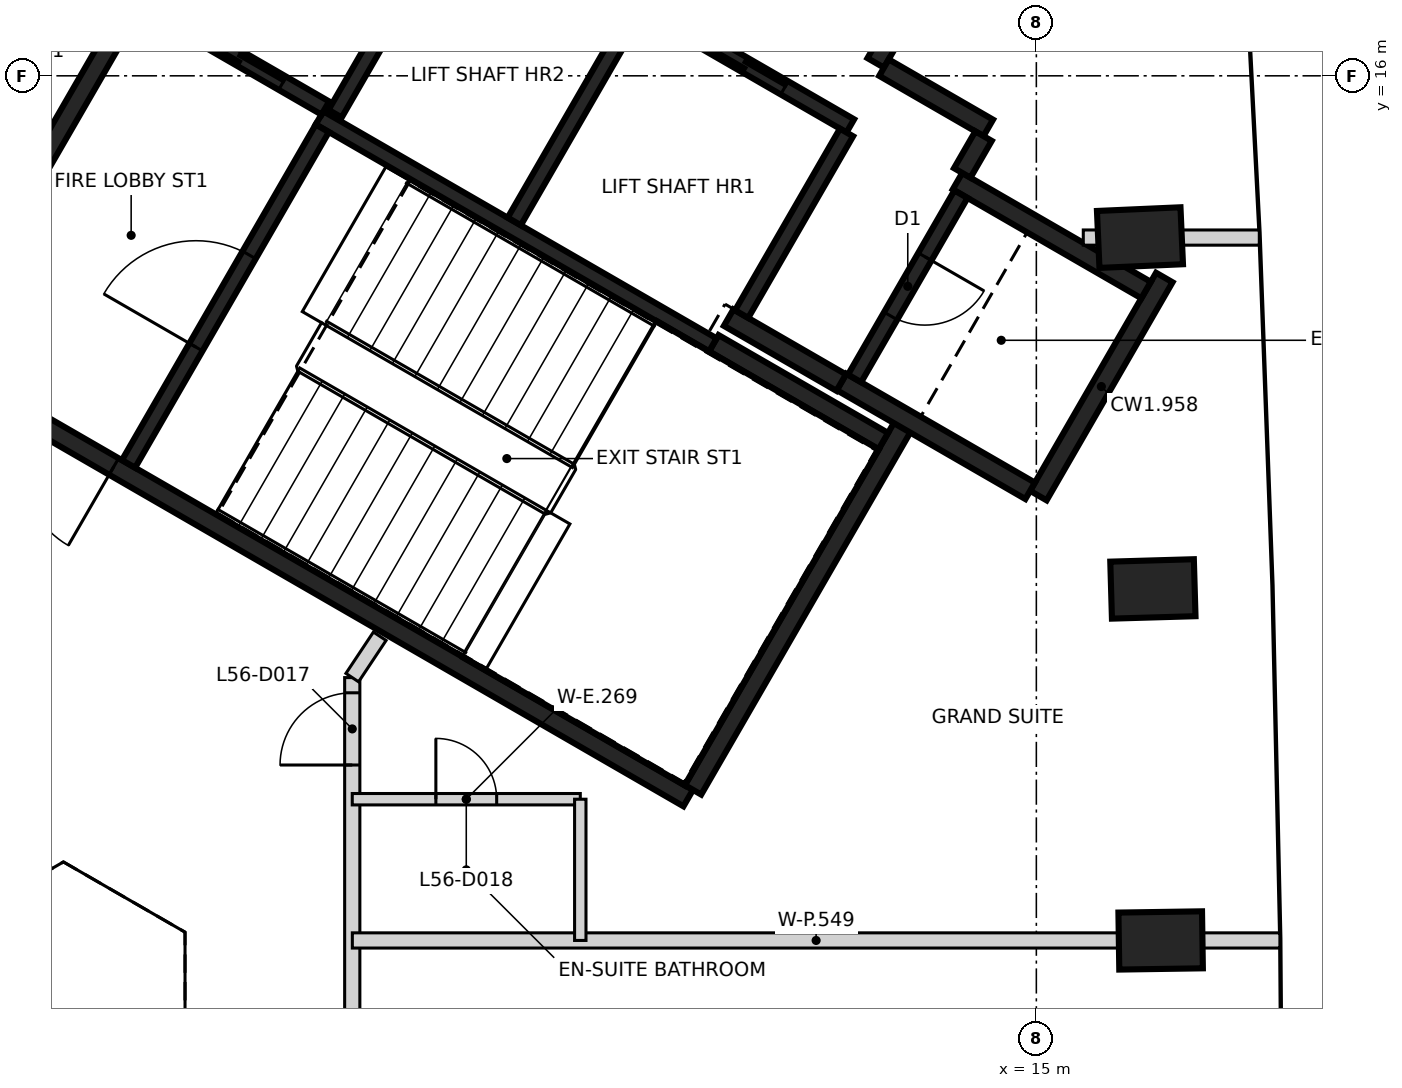
"""IFC4 building model, lengths in metres.
Left out: names, types, materials, properties, quantities, classifications, styles, units other than length and angle.
Written with IfcOpenShell. Run it as: python <this file> out.ifc"""

import sys

from ifc_helpers import new_model, si_unit, direction, frame, frame_2d, origin, origin_2d, place, context, subcontext, project, spatial, rectangle, extrude, element, fill, save


model = new_model("IFC4")
c1 = context("Model", 3, precision=1e-05, world=origin(), true_north=direction((0.0, 1.0)))
c2 = subcontext(c1, "Body", "Model", "MODEL_VIEW")
j1 = project(units=[si_unit("LENGTHUNIT", "METRE"), si_unit("PLANEANGLEUNIT", "RADIAN")], contexts=[c1])
p1 = place(None, origin())
s1 = spatial("IfcSite", under=j1, at=p1, CompositionType="ELEMENT")
p2 = place(p1, origin())
s2 = spatial("IfcBuilding", under=s1, at=p2, CompositionType="ELEMENT")
p3 = place(p2, frame((0.0, 0.0, 225.0)))
s3 = spatial("IfcBuildingStorey", under=s2, at=p3, CompositionType="ELEMENT", Elevation=225.0)
for number, where, z_axis, x_axis in (
    (1, (16.635, 4.625, -0.35), (0.0, 0.0, 1.0), (1.0, 0.015, 0.0)),
    (2, (16.533, 9.25, -0.35), (0.0, 0.0, 1.0), (1.0, 0.029, 0.0)),
    (3, (16.363, 13.872, -0.35), (0.0, 0.0, 1.0), (0.999, 0.044, 0.0)),
):
    element("IfcColumn", number, at=place(p3, frame(where, z_axis=z_axis, x_axis=x_axis)), inside=s3, PredefinedType="COLUMN", context=c2, shape_type="SweptSolid", body=[
        extrude(rectangle(XDim=1.1, YDim=0.75, at=origin_2d()), origin(), (0.0, 0.0, 1.0), 3.6),
    ])
p4 = place(p3, frame((10.42, 6.498, 0.0), z_axis=(0.0, 0.0, 1.0), x_axis=(-0.866021906294, 0.500006057782, 0.0)))
e4 = element("IfcWall", 4, at=p4, inside=s3, PredefinedType="SHEAR", context=c2, shape_type="SweptSolid", body=[
    extrude(rectangle(XDim=11.55, YDim=0.25, at=frame_2d((5.775, 0.0))), origin(), (0.0, 0.0, 1.0), 3.25),
])
p5 = place(p4, frame((10.025, 0.0, 0.0)))
e5 = element("IfcOpeningElement", 5, at=p5, cuts=e4, PredefinedType="OPENING", context=c2, shape_type="SweptSolid", body=[
    extrude(rectangle(XDim=1.2, YDim=2.1, at=frame_2d((0.6, 1.05))), frame((0.0, 0.135, 0.0), z_axis=(0.0, -1.0, 0.0), x_axis=(1.0, 0.0, 0.0)), (0.0, 0.0, 1.0), 0.27),
])
p6 = place(p4, frame((8.725, 0.0, 0.0)))
e6 = element("IfcOpeningElement", 6, at=p6, cuts=e4, PredefinedType="OPENING", context=c2, shape_type="SweptSolid", body=[
    extrude(rectangle(XDim=1.2, YDim=2.1, at=frame_2d((0.6, 1.05))), frame((0.0, 0.135, 0.0), z_axis=(0.0, -1.0, 0.0), x_axis=(1.0, 0.0, 0.0)), (0.0, 0.0, 1.0), 0.27),
])
p7 = place(p3, frame((0.48, 12.381, 0.0), z_axis=(0.0, 0.0, 1.0), x_axis=(0.49999885962, 0.866026062182, 0.0)))
e7 = element("IfcWall", 7, at=p7, inside=s3, PredefinedType="SHEAR", context=c2, shape_type="SweptSolid", body=[
    extrude(rectangle(XDim=5.225, YDim=0.25, at=frame_2d((2.612, 0.0))), origin(), (0.0, 0.0, 1.0), 3.25),
])
p8 = place(p3, frame((13.238, 11.378, 0.0), z_axis=(0.0, 0.0, 1.0), x_axis=(-0.500008851346, -0.866020293397, 0.0)))
e8 = element("IfcWall", 8, at=p8, inside=s3, PredefinedType="SHEAR", context=c2, shape_type="SweptSolid", body=[
    extrude(rectangle(XDim=5.51, YDim=0.25, at=frame_2d((2.755, 0.0))), origin(), (0.0, 0.0, 1.0), 3.25),
])
p9 = place(p3, frame((16.684, 13.347, 0.0), z_axis=(0.0, 0.0, 1.0), x_axis=(-0.499998874531, -0.866026053573, 0.0)))
e9 = element("IfcWall", 9, at=p9, inside=s3, PredefinedType="SHEAR", context=c2, shape_type="SweptSolid", body=[
    extrude(rectangle(XDim=3.313, YDim=0.25, at=frame_2d((1.656, 0.0))), origin(), (0.0, 0.0, 1.0), 3.25),
])
p10 = place(p3, frame((14.918, 10.54, 0.0), z_axis=(0.0, 0.0, 1.0), x_axis=(-0.866063538972, 0.499933942099, 0.0)))
e10 = element("IfcWall", 10, at=p10, inside=s3, PredefinedType="SHEAR", context=c2, shape_type="SweptSolid", body=[
    extrude(rectangle(XDim=2.865, YDim=0.25, at=frame_2d((1.432, 0.0))), origin(), (0.0, 0.0, 1.0), 3.25),
])
p11 = place(p3, frame((13.963, 14.614, 0.0), z_axis=(0.0, 0.0, 1.0), x_axis=(0.866042235819, -0.499970844928, 0.0)))
e11 = element("IfcWall", 11, at=p11, inside=s3, PredefinedType="SHEAR", context=c2, shape_type="SweptSolid", body=[
    extrude(rectangle(XDim=2.865, YDim=0.25, at=frame_2d((1.432, 0.0))), origin(), (0.0, 0.0, 1.0), 3.25),
])
p12 = place(p3, frame((10.757, 12.481, 0.0), z_axis=(0.0, 0.0, 1.0), x_axis=(0.866022940537, -0.500004266446, 0.0)))
e12 = element("IfcWall", 12, at=p12, inside=s3, PredefinedType="SHEAR", context=c2, shape_type="SweptSolid", body=[
    extrude(rectangle(XDim=2.575, YDim=0.25, at=frame_2d((1.287, 0.0))), origin(), (0.0, 0.0, 1.0), 3.25),
])
p13 = place(p3, frame((13.819, 17.785, 0.0), z_axis=(0.0, 0.0, 1.0), x_axis=(-0.500039802285, -0.866002422705, 0.0)))
e13 = element("IfcWall", 13, at=p13, inside=s3, PredefinedType="SHEAR", context=c2, shape_type="SweptSolid", body=[
    extrude(rectangle(XDim=1.865, YDim=0.25, at=frame_2d((0.932, 0.0))), origin(), (0.0, 0.0, 1.0), 3.25),
])
p14 = place(p3, frame((12.433, 11.964, 0.0), z_axis=(0.0, 0.0, 1.0), x_axis=(-0.866038183914, 0.499977863513, 0.0)))
e14 = element("IfcWall", 14, at=p14, inside=s3, PredefinedType="SHEAR", context=c2, shape_type="SweptSolid", body=[
    extrude(rectangle(XDim=1.71, YDim=0.25, at=frame_2d((0.855, 0.0))), origin(), (0.0, 0.0, 1.0), 3.25),
])
p15 = place(p3, frame((12.995, 16.108, 0.0), z_axis=(0.0, 0.0, 1.0), x_axis=(0.866044474677, -0.49996696679, 0.0)))
e15 = element("IfcWall", 15, at=p15, inside=s3, PredefinedType="SHEAR", context=c2, shape_type="SweptSolid", body=[
    extrude(rectangle(XDim=1.584, YDim=0.25, at=frame_2d((0.792, 0.0))), origin(), (0.0, 0.0, 1.0), 3.25),
])
p16 = place(p3, frame((14.305, 15.207, 0.0), z_axis=(0.0, 0.0, 1.0), x_axis=(-0.499848422343, -0.866112899501, 0.0)))
e16 = element("IfcWall", 16, at=p16, inside=s3, PredefinedType="SHEAR", context=c2, shape_type="SweptSolid", body=[
    extrude(rectangle(XDim=0.559, YDim=0.25, at=frame_2d((0.28, 0.0))), origin(), (0.0, 0.0, 1.0), 3.25),
])
p17 = place(p3, frame((12.552, 15.342, 0.0), z_axis=(0.0, 0.0, 1.0), x_axis=(-0.866030299012, 0.499991521122, 0.0)))
e17 = element("IfcWall", 17, at=p17, inside=s3, PredefinedType="SHEAR", context=c2, shape_type="SweptSolid", body=[
    extrude(rectangle(XDim=6.1, YDim=0.2, at=frame_2d((3.05, 0.0))), origin(), (0.0, 0.0, 1.0), 3.25),
])
p18 = place(p17, frame((1.0, 0.0, 0.0)))
e18 = element("IfcOpeningElement", 18, at=p18, cuts=e17, PredefinedType="OPENING", context=c2, shape_type="SweptSolid", body=[
    extrude(rectangle(XDim=1.2, YDim=2.1, at=frame_2d((0.6, 1.05))), frame((0.0, 0.11, 0.0), z_axis=(0.0, -1.0, 0.0), x_axis=(1.0, 0.0, 0.0)), (0.0, 0.0, 1.0), 0.22),
])
p19 = place(p17, frame((3.982, 0.0, 0.0)))
e19 = element("IfcOpeningElement", 19, at=p19, cuts=e17, PredefinedType="OPENING", context=c2, shape_type="SweptSolid", body=[
    extrude(rectangle(XDim=1.2, YDim=2.1, at=frame_2d((0.6, 1.05))), frame((0.0, 0.11, 0.0), z_axis=(0.0, -1.0, 0.0), x_axis=(1.0, 0.0, 0.0)), (0.0, 0.0, 1.0), 0.22),
])
p20 = place(p3, frame((10.743, 12.46, 0.0), z_axis=(0.0, 0.0, 1.0), x_axis=(-0.866018848283, 0.500011354289, 0.0)))
e20 = element("IfcWall", 20, at=p20, inside=s3, PredefinedType="SHEAR", context=c2, shape_type="SweptSolid", body=[
    extrude(rectangle(XDim=5.974, YDim=0.2, at=frame_2d((2.987, 0.0))), origin(), (0.0, 0.0, 1.0), 3.25),
])
p21 = place(p3, frame((3.057, 10.895, 0.0), z_axis=(0.0, 0.0, 1.0), x_axis=(0.500027839223, 0.866009330205, 0.0)))
e21 = element("IfcWall", 21, at=p21, inside=s3, PredefinedType="SHEAR", context=c2, shape_type="SweptSolid", body=[
    extrude(rectangle(XDim=5.098, YDim=0.2, at=frame_2d((2.549, 0.0))), origin(), (0.0, 0.0, 1.0), 3.25),
])
p22 = place(p21, frame((1.774, 0.0, 0.0)))
e22 = element("IfcOpeningElement", 22, at=p22, cuts=e21, PredefinedType="OPENING", context=c2, shape_type="SweptSolid", body=[
    extrude(rectangle(XDim=1.4, YDim=2.1, at=frame_2d((0.7, 1.05))), frame((0.0, 0.11, 0.0), z_axis=(0.0, -1.0, 0.0), x_axis=(1.0, 0.0, 0.0)), (0.0, 0.0, 1.0), 0.22),
])
p23 = place(p3, frame((8.132, 14.084, 0.0), z_axis=(0.0, 0.0, 1.0), x_axis=(0.500030834389, 0.86600760081, 0.0)))
e23 = element("IfcWall", 23, at=p23, inside=s3, PredefinedType="SHEAR", context=c2, shape_type="SweptSolid", body=[
    extrude(rectangle(XDim=3.198, YDim=0.2, at=frame_2d((1.599, 0.0))), origin(), (0.0, 0.0, 1.0), 3.25),
])
p24 = place(p3, frame((14.008, 14.442, 0.0), z_axis=(0.0, 0.0, 1.0), x_axis=(-0.499986818241, -0.866033014143, 0.0)))
e24 = element("IfcWall", 24, at=p24, inside=s3, PredefinedType="SHEAR", context=c2, shape_type="SweptSolid", body=[
    extrude(rectangle(XDim=2.798, YDim=0.2, at=frame_2d((1.399, 0.0))), origin(), (0.0, 0.0, 1.0), 3.25),
])
p25 = place(p24, frame((0.949, 0.0, 0.0)))
e25 = element("IfcOpeningElement", 25, at=p25, cuts=e24, PredefinedType="OPENING", context=c2, shape_type="SweptSolid", body=[
    extrude(rectangle(XDim=0.9, YDim=2.1, at=frame_2d((0.45, 1.05))), frame((0.0, 0.11, 0.0), z_axis=(0.0, -1.0, 0.0), x_axis=(1.0, 0.0, 0.0)), (0.0, 0.0, 1.0), 0.22),
])
p26 = place(p3, frame((12.502, 15.255, 0.0), z_axis=(0.0, 0.0, 1.0), x_axis=(-0.499965018551, -0.866045599391, 0.0)))
e26 = element("IfcWall", 26, at=p26, inside=s3, PredefinedType="SHEAR", context=c2, shape_type="SweptSolid", body=[
    extrude(rectangle(XDim=2.759, YDim=0.2, at=frame_2d((1.379, 0.0))), origin(), (0.0, 0.0, 1.0), 3.25),
])
p27 = place(p3, frame((7.324, 18.187, 0.0), z_axis=(0.0, 0.0, 1.0), x_axis=(-0.499967891604, -0.866043940782, 0.0)))
e27 = element("IfcWall", 27, at=p27, inside=s3, PredefinedType="SHEAR", context=c2, shape_type="SweptSolid", body=[
    extrude(rectangle(XDim=3.1, YDim=0.2, at=frame_2d((1.55, 0.0))), origin(), (0.0, 0.0, 1.0), 3.25),
])
p28 = place(p3, frame((5.646, 15.576, 0.0), z_axis=(0.0, 0.0, 1.0), x_axis=(-0.866018407898, 0.500012117035, 0.0)))
e28 = element("IfcWall", 28, at=p28, inside=s3, PredefinedType="SHEAR", context=c2, shape_type="SweptSolid", body=[
    extrude(rectangle(XDim=2.651, YDim=0.2, at=frame_2d((1.325, 0.0))), origin(), (0.0, 0.0, 1.0), 3.25),
])
p29 = place(p28, frame((0.652, 0.0, 0.0)))
e29 = element("IfcOpeningElement", 29, at=p29, cuts=e28, PredefinedType="OPENING", context=c2, shape_type="SweptSolid", body=[
    extrude(rectangle(XDim=1.3, YDim=2.1, at=frame_2d((0.65, 1.05))), frame((0.0, 0.11, 0.0), z_axis=(0.0, -1.0, 0.0), x_axis=(1.0, 0.0, 0.0)), (0.0, 0.0, 1.0), 0.22),
])
p30 = place(p3, frame((-1.035, 12.73, 0.0), z_axis=(0.0, 0.0, 1.0), x_axis=(0.46738248691, 0.884055208078, 0.0)))
e30 = element("IfcWall", 30, at=p30, inside=s3, PredefinedType="PARTITIONING", context=c2, shape_type="SweptSolid", body=[
    extrude(rectangle(XDim=8.705, YDim=0.2, at=frame_2d((4.352, 0.0))), origin(), (0.0, 0.0, 1.0), 3.25),
])
p31 = place(p30, frame((5.638, 0.0, 0.0)))
e31 = element("IfcOpeningElement", 31, at=p31, cuts=e30, PredefinedType="OPENING", context=c2, shape_type="SweptSolid", body=[
    extrude(rectangle(XDim=0.95, YDim=2.1, at=frame_2d((0.475, 1.05))), frame((0.0, 0.11, 0.0), z_axis=(0.0, -1.0, 0.0), x_axis=(1.0, 0.0, 0.0)), (0.0, 0.0, 1.0), 0.22),
])
p32 = place(p3, frame((6.0, -4.721, 0.0), z_axis=(0.0, 0.0, 1.0), x_axis=(0.0, 1.0, 0.0)))
e32 = element("IfcWall", 32, at=p32, inside=s3, PredefinedType="PARTITIONING", context=c2, shape_type="SweptSolid", body=[
    extrude(rectangle(XDim=12.804, YDim=0.2, at=frame_2d((6.402, 0.0))), origin(), (0.0, 0.0, 1.0), 3.25),
])
p33 = place(p32, frame((3.979, 0.0, 0.0)))
e33 = element("IfcOpeningElement", 33, at=p33, cuts=e32, PredefinedType="OPENING", context=c2, shape_type="SweptSolid", body=[
    extrude(rectangle(XDim=1.4, YDim=2.1, at=frame_2d((0.7, 1.05))), frame((0.0, 0.11, 0.0), z_axis=(0.0, -1.0, 0.0), x_axis=(1.0, 0.0, 0.0)), (0.0, 0.0, 1.0), 0.22),
])
p34 = place(p32, frame((11.654, 0.0, 0.0)))
e34 = element("IfcOpeningElement", 34, at=p34, cuts=e32, PredefinedType="OPENING", context=c2, shape_type="SweptSolid", body=[
    extrude(rectangle(XDim=0.95, YDim=2.1, at=frame_2d((0.475, 1.05))), frame((0.0, 0.11, 0.0), z_axis=(0.0, -1.0, 0.0), x_axis=(1.0, 0.0, 0.0)), (0.0, 0.0, 1.0), 0.22),
])
p35 = place(p3, frame((6.0, 8.083, 0.0), z_axis=(0.0, 0.0, 1.0), x_axis=(0.553665201502, 0.832739361773, 0.0)))
e35 = element("IfcWall", 35, at=p35, inside=s3, PredefinedType="PARTITIONING", context=c2, shape_type="SweptSolid", body=[
    extrude(rectangle(XDim=0.654, YDim=0.2, at=frame_2d((0.327, 0.0))), origin(), (0.0, 0.0, 1.0), 3.25),
])
p36 = place(p3, frame((6.001, 4.625, 0.0), z_axis=(0.0, 0.0, 1.0), x_axis=(1.0, 0.0, 0.0)))
e36 = element("IfcWall", 36, at=p36, inside=s3, PredefinedType="PARTITIONING", context=c2, shape_type="SweptSolid", body=[
    extrude(rectangle(XDim=12.203, YDim=0.2, at=frame_2d((6.102, 0.0))), origin(), (0.0, 0.0, 1.0), 3.25),
])
p37 = place(p3, frame((15.618, 13.872, 0.0), z_axis=(0.0, 0.0, 1.0), x_axis=(1.0, 0.0, 0.0)))
e37 = element("IfcWall", 37, at=p37, inside=s3, PredefinedType="PARTITIONING", context=c2, shape_type="SweptSolid", body=[
    extrude(rectangle(XDim=2.316, YDim=0.2, at=frame_2d((1.158, 0.0))), origin(), (0.0, 0.0, 1.0), 3.25),
])
p38 = place(p3, frame((6.0, 6.483, 0.0), z_axis=(0.0, 0.0, 1.0), x_axis=(1.0, 0.0, 0.0)))
e38 = element("IfcWall", 38, at=p38, inside=s3, PredefinedType="PARTITIONING", context=c2, shape_type="SweptSolid", body=[
    extrude(rectangle(XDim=3.0, YDim=0.15, at=frame_2d((1.5, 0.0))), origin(), (0.0, 0.0, 1.0), 3.25),
])
p39 = place(p38, frame((1.1, 0.0, 0.0)))
e39 = element("IfcOpeningElement", 39, at=p39, cuts=e38, PredefinedType="OPENING", context=c2, shape_type="SweptSolid", body=[
    extrude(rectangle(XDim=0.8, YDim=2.1, at=frame_2d((0.4, 1.05))), frame((0.0, 0.085, 0.0), z_axis=(0.0, -1.0, 0.0), x_axis=(1.0, 0.0, 0.0)), (0.0, 0.0, 1.0), 0.17),
])
p40 = place(p3, frame((9.0, 4.625, 0.0), z_axis=(0.0, 0.0, 1.0), x_axis=(0.0, 1.0, 0.0)))
e40 = element("IfcWall", 40, at=p40, inside=s3, PredefinedType="PARTITIONING", context=c2, shape_type="SweptSolid", body=[
    extrude(rectangle(XDim=1.858, YDim=0.15, at=frame_2d((0.929, 0.0))), origin(), (0.0, 0.0, 1.0), 3.25),
])
p41 = place(p29, origin())
e41 = element("IfcDoor", 41, at=p41, inside=s3, OperationType="SLIDING_TO_RIGHT", PredefinedType="DOOR", context=c2, shape_type="SweptSolid", body=[
    extrude(rectangle(XDim=1.3, YDim=2.1, at=frame_2d((0.65, 1.05))), frame((0.0, 0.025, 0.0), z_axis=(0.0, -1.0, 0.0), x_axis=(1.0, 0.0, 0.0)), (0.0, 0.0, 1.0), 0.05),
])
fill(e29, e41)
p42 = place(p18, origin())
e42 = element("IfcDoor", 42, at=p42, inside=s3, OperationType="DOUBLE_DOOR_SLIDING", PredefinedType="DOOR", context=c2, shape_type="SweptSolid", body=[
    extrude(rectangle(XDim=1.2, YDim=2.1, at=frame_2d((0.6, 1.05))), frame((0.0, 0.025, 0.0), z_axis=(0.0, -1.0, 0.0), x_axis=(1.0, 0.0, 0.0)), (0.0, 0.0, 1.0), 0.05),
])
fill(e18, e42)
p43 = place(p6, origin())
e43 = element("IfcDoor", 43, at=p43, inside=s3, OperationType="SINGLE_SWING_RIGHT", PredefinedType="DOOR", context=c2, shape_type="SweptSolid", body=[
    extrude(rectangle(XDim=1.2, YDim=2.1, at=frame_2d((0.6, 1.05))), frame((0.0, 0.025, 0.0), z_axis=(0.0, -1.0, 0.0), x_axis=(1.0, 0.0, 0.0)), (0.0, 0.0, 1.0), 0.05),
])
fill(e6, e43)
p44 = place(p22, origin())
e44 = element("IfcDoor", 44, at=p44, inside=s3, OperationType="SINGLE_SWING_RIGHT", PredefinedType="DOOR", context=c2, shape_type="SweptSolid", body=[
    extrude(rectangle(XDim=1.4, YDim=2.1, at=frame_2d((0.7, 1.05))), frame((0.0, 0.025, 0.0), z_axis=(0.0, -1.0, 0.0), x_axis=(1.0, 0.0, 0.0)), (0.0, 0.0, 1.0), 0.05),
])
fill(e22, e44)
p45 = place(p25, origin())
e45 = element("IfcDoor", 45, at=p45, inside=s3, OperationType="SINGLE_SWING_LEFT", PredefinedType="DOOR", context=c2, shape_type="SweptSolid", body=[
    extrude(rectangle(XDim=0.9, YDim=2.1, at=frame_2d((0.45, 1.05))), frame((0.0, 0.025, 0.0), z_axis=(0.0, -1.0, 0.0), x_axis=(1.0, 0.0, 0.0)), (0.0, 0.0, 1.0), 0.05),
])
fill(e25, e45)
p46 = place(p34, frame((0.95, 0.0, 0.0), z_axis=(0.0, 0.0, 1.0), x_axis=(-1.0, 0.0, 0.0)))
e46 = element("IfcDoor", 46, at=p46, inside=s3, OperationType="SINGLE_SWING_LEFT", PredefinedType="DOOR", context=c2, shape_type="SweptSolid", body=[
    extrude(rectangle(XDim=0.95, YDim=2.1, at=frame_2d((0.475, 1.05))), frame((0.0, 0.025, 0.0), z_axis=(0.0, -1.0, 0.0), x_axis=(1.0, 0.0, 0.0)), (0.0, 0.0, 1.0), 0.05),
])
fill(e34, e46)
p47 = place(p39, origin())
e47 = element("IfcDoor", 47, at=p47, inside=s3, OperationType="SINGLE_SWING_LEFT", PredefinedType="DOOR", context=c2, shape_type="SweptSolid", body=[
    extrude(rectangle(XDim=0.8, YDim=2.1, at=frame_2d((0.4, 1.05))), frame((0.0, 0.025, 0.0), z_axis=(0.0, -1.0, 0.0), x_axis=(1.0, 0.0, 0.0)), (0.0, 0.0, 1.0), 0.05),
])
fill(e39, e47)
save(model, sys.argv[1])
